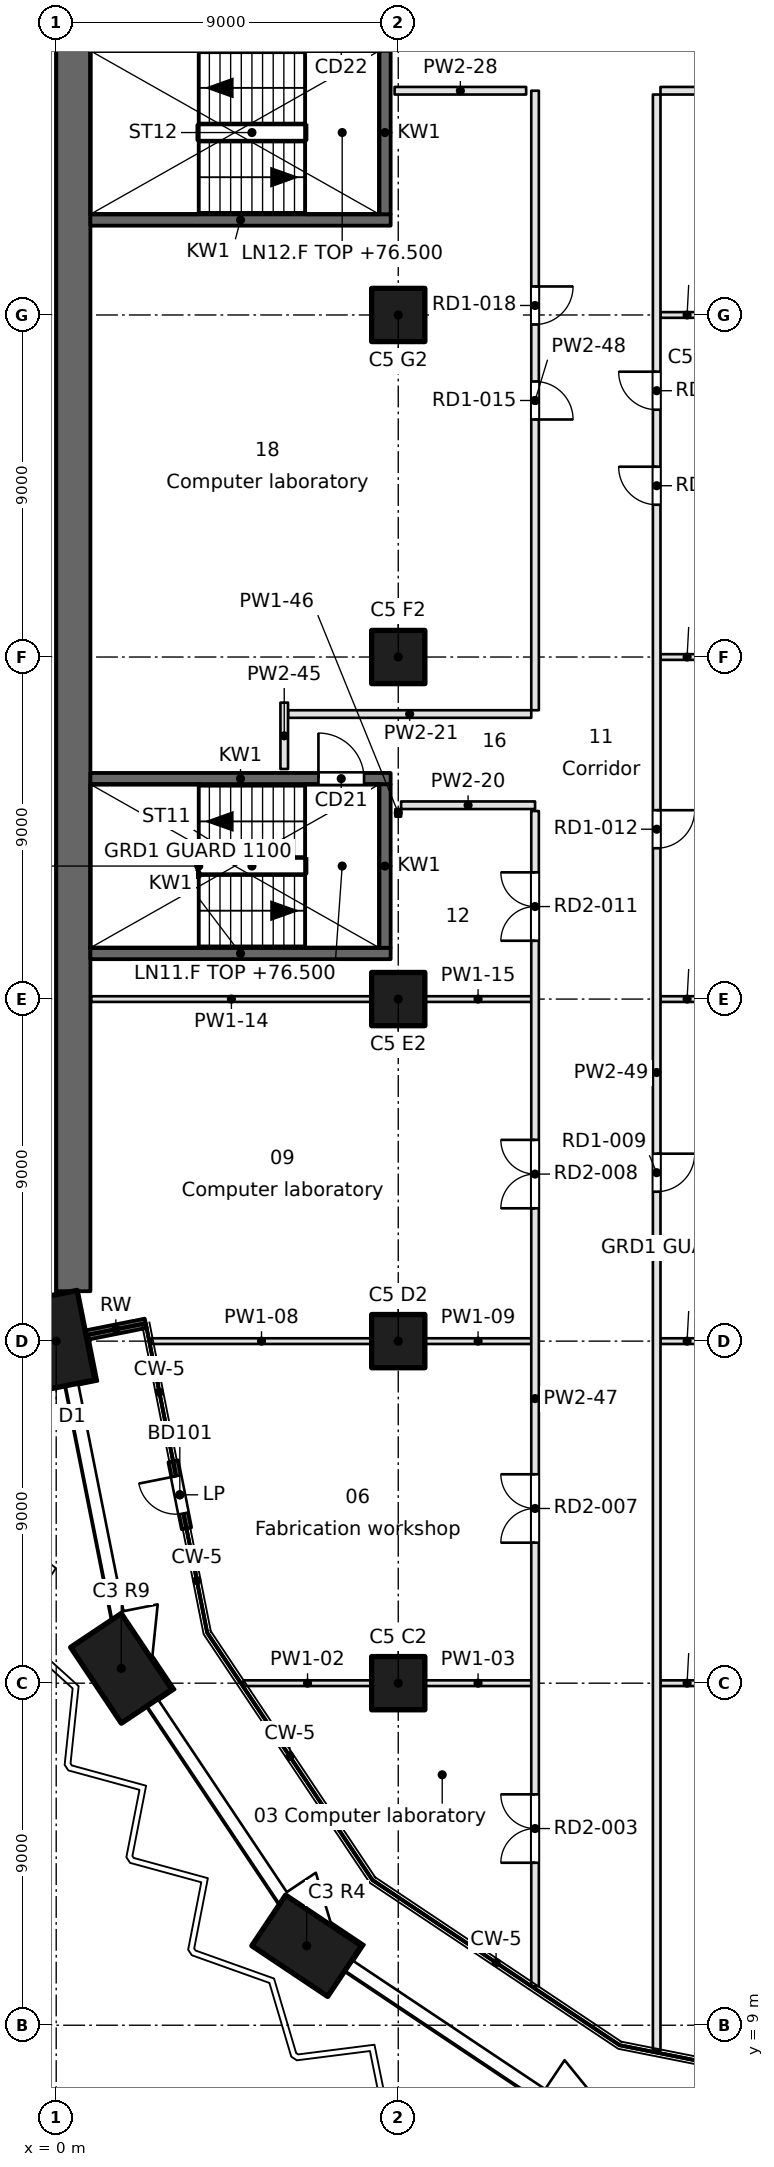
"""IFC4 building model, lengths in metres.
Left out: names, types, materials, properties, quantities, classifications, styles, units other than length and angle.
Written with IfcOpenShell. Run it as: python <this file> out.ifc"""

import sys

from ifc_helpers import new_model, si_unit, direction, frame, frame_2d, origin, origin_2d, place, context, subcontext, project, spatial, rectangle, extrude, element, fill, save


model = new_model("IFC4")
c1 = context("Model", 3, precision=1e-05, world=origin(), true_north=direction((0.0, 1.0)))
c2 = subcontext(c1, "Body", "Model", "MODEL_VIEW")
j1 = project(units=[si_unit("LENGTHUNIT", "METRE"), si_unit("PLANEANGLEUNIT", "RADIAN")], contexts=[c1])
p1 = place(None, origin())
s1 = spatial("IfcSite", under=j1, at=p1, CompositionType="ELEMENT")
p2 = place(p1, origin())
s2 = spatial("IfcBuilding", under=s1, at=p2, CompositionType="ELEMENT")
p3 = place(p2, frame((0.0, 0.0, 76.5)))
s3 = spatial("IfcBuildingStorey", under=s2, at=p3, CompositionType="ELEMENT", Elevation=76.5)
for number, where, z_axis, x_axis in (
    (1, (6.59, 11.09, 0.0), (0.0, 0.0, 1.0), (-0.831, 0.556, 0.0)),
    (2, (1.713, 18.39, 0.0), (0.0, 0.0, 1.0), (-0.556, 0.831, 0.0)),
    (3, (0.0, 27.0, 0.0), (0.0, 0.0, 1.0), (-0.195, 0.981, 0.0)),
):
    element("IfcColumn", number, at=place(p3, frame(where, z_axis=z_axis, x_axis=x_axis)), inside=s3, PredefinedType="COLUMN", context=c2, shape_type="SweptSolid", body=[
        extrude(rectangle(XDim=2.4, YDim=1.6, at=origin_2d()), origin(), (0.0, 0.0, 1.0), 3.7),
    ])
for number, where, z_axis, x_axis in (
    (4, (9.0, 18.0, 0.0), (0.0, 0.0, 1.0), (1.0, 0.0, 0.0)),
    (5, (9.0, 27.0, 0.0), (0.0, 0.0, 1.0), (1.0, 0.0, 0.0)),
    (6, (9.0, 36.0, 0.0), (0.0, 0.0, 1.0), (1.0, 0.0, 0.0)),
    (7, (9.0, 45.0, 0.0), (0.0, 0.0, 1.0), (1.0, 0.0, 0.0)),
    (8, (9.0, 54.0, 0.0), (0.0, 0.0, 1.0), (1.0, 0.0, 0.0)),
):
    element("IfcColumn", number, at=place(p3, frame(where, z_axis=z_axis, x_axis=x_axis)), inside=s3, PredefinedType="COLUMN", context=c2, shape_type="SweptSolid", body=[
        extrude(rectangle(XDim=1.4, YDim=1.4, at=origin_2d()), origin(), (0.0, 0.0, 1.0), 3.7),
    ])
p4 = place(p3, frame((0.45, 94.5, 0.0), z_axis=(0.0, 0.0, 1.0), x_axis=(0.0, -1.0, 0.0)))
e9 = element("IfcWall", 9, at=p4, inside=s3, PredefinedType="SHEAR", context=c2, shape_type="SweptSolid", body=[
    extrude(rectangle(XDim=66.187, YDim=0.9, at=frame_2d((33.094, 0.0))), origin(), (0.0, 0.0, 1.0), 3.7),
])
p5 = place(p3, frame((0.784, 27.157, 0.0), z_axis=(0.0, 0.0, 1.0), x_axis=(0.980826234823, 0.19488431718, 0.0)))
e10 = element("IfcWall", 10, at=p5, inside=s3, PredefinedType="SOLIDWALL", context=c2, shape_type="SweptSolid", body=[
    extrude(rectangle(XDim=1.601, YDim=0.25, at=frame_2d((0.801, 0.0))), origin(), (0.0, 0.0, 1.0), 3.25),
])
p6 = place(p3, frame((3.077, 23.839, 0.0), z_axis=(0.0, 0.0, 1.0), x_axis=(0.195046569833, -0.980793982239, 0.0)))
e11 = element("IfcWall", 11, at=p6, inside=s3, PredefinedType="SOLIDWALL", context=c2, shape_type="SweptSolid", body=[
    extrude(rectangle(XDim=1.8, YDim=0.25, at=frame_2d((0.9, 0.0))), origin(), (0.0, 0.0, 1.0), 3.25),
])
p7 = place(p6, frame((0.4, 0.0, 0.0)))
e12 = element("IfcOpeningElement", 12, at=p7, cuts=e11, PredefinedType="OPENING", context=c2, shape_type="SweptSolid", body=[
    extrude(rectangle(XDim=1.0, YDim=2.1, at=frame_2d((0.5, 1.05))), frame((0.0, 0.125, 0.0), z_axis=(0.0, -1.0, 0.0), x_axis=(1.0, 0.0, 0.0)), (0.0, 0.0, 1.0), 0.25),
])
p8 = place(p3, frame((0.9, 37.2, -0.4), z_axis=(0.0, 0.0, 1.0), x_axis=(1.0, 0.0, 0.0)))
e13 = element("IfcWall", 13, at=p8, inside=s3, PredefinedType="SOLIDWALL", context=c2, shape_type="SweptSolid", body=[
    extrude(rectangle(XDim=7.9, YDim=0.3, at=frame_2d((3.95, 0.0))), origin(), (0.0, 0.0, 1.0), 3.65),
])
p9 = place(p3, frame((0.9, 41.8, -0.4), z_axis=(0.0, 0.0, 1.0), x_axis=(1.0, 0.0, 0.0)))
e14 = element("IfcWall", 14, at=p9, inside=s3, PredefinedType="SOLIDWALL", context=c2, shape_type="SweptSolid", body=[
    extrude(rectangle(XDim=7.9, YDim=0.3, at=frame_2d((3.95, 0.0))), origin(), (0.0, 0.0, 1.0), 3.65),
])
p10 = place(p9, frame((6.0, 0.0, 0.4)))
e15 = element("IfcOpeningElement", 15, at=p10, cuts=e14, PredefinedType="OPENING", context=c2, shape_type="SweptSolid", body=[
    extrude(rectangle(XDim=1.2, YDim=2.1, at=frame_2d((0.6, 1.05))), frame((0.0, 0.15, 0.0), z_axis=(0.0, -1.0, 0.0), x_axis=(1.0, 0.0, 0.0)), (0.0, 0.0, 1.0), 0.3),
])
p11 = place(p3, frame((0.9, 56.5, -0.4), z_axis=(0.0, 0.0, 1.0), x_axis=(1.0, 0.0, 0.0)))
e16 = element("IfcWall", 16, at=p11, inside=s3, PredefinedType="SOLIDWALL", context=c2, shape_type="SweptSolid", body=[
    extrude(rectangle(XDim=7.9, YDim=0.3, at=frame_2d((3.95, 0.0))), origin(), (0.0, 0.0, 1.0), 3.65),
])
p12 = place(p3, frame((8.65, 37.35, -0.4), z_axis=(0.0, 0.0, 1.0), x_axis=(0.0, 1.0, 0.0)))
e17 = element("IfcWall", 17, at=p12, inside=s3, PredefinedType="SOLIDWALL", context=c2, shape_type="SweptSolid", body=[
    extrude(rectangle(XDim=4.3, YDim=0.3, at=frame_2d((2.15, 0.0))), origin(), (0.0, 0.0, 1.0), 3.65),
])
p13 = place(p3, frame((8.65, 56.65, -0.4), z_axis=(0.0, 0.0, 1.0), x_axis=(0.0, 1.0, 0.0)))
e18 = element("IfcWall", 18, at=p13, inside=s3, PredefinedType="SOLIDWALL", context=c2, shape_type="SweptSolid", body=[
    extrude(rectangle(XDim=4.3, YDim=0.3, at=frame_2d((2.15, 0.0))), origin(), (0.0, 0.0, 1.0), 3.65),
])
p14 = place(p3, frame((4.926, 18.0, 0.0), z_axis=(0.0, 0.0, 1.0), x_axis=(1.0, 0.0, 0.0)))
e19 = element("IfcWall", 19, at=p14, inside=s3, PredefinedType="PARTITIONING", context=c2, shape_type="SweptSolid", body=[
    extrude(rectangle(XDim=3.375, YDim=0.15, at=frame_2d((1.687, 0.0))), origin(), (0.0, 0.0, 1.0), 3.25),
])
p15 = place(p3, frame((9.7, 18.0, 0.0), z_axis=(0.0, 0.0, 1.0), x_axis=(1.0, 0.0, 0.0)))
e20 = element("IfcWall", 20, at=p15, inside=s3, PredefinedType="PARTITIONING", context=c2, shape_type="SweptSolid", body=[
    extrude(rectangle(XDim=2.8, YDim=0.15, at=frame_2d((1.4, 0.0))), origin(), (0.0, 0.0, 1.0), 3.25),
])
p16 = place(p3, frame((15.9, 18.0, 0.0), z_axis=(0.0, 0.0, 1.0), x_axis=(1.0, 0.0, 0.0)))
e21 = element("IfcWall", 21, at=p16, inside=s3, PredefinedType="PARTITIONING", context=c2, shape_type="SweptSolid", body=[
    extrude(rectangle(XDim=1.4, YDim=0.15, at=frame_2d((0.7, 0.0))), origin(), (0.0, 0.0, 1.0), 3.25),
])
p17 = place(p3, frame((2.503, 27.0, 0.0), z_axis=(0.0, 0.0, 1.0), x_axis=(1.0, 0.0, 0.0)))
e22 = element("IfcWall", 22, at=p17, inside=s3, PredefinedType="PARTITIONING", context=c2, shape_type="SweptSolid", body=[
    extrude(rectangle(XDim=5.797, YDim=0.15, at=frame_2d((2.898, 0.0))), origin(), (0.0, 0.0, 1.0), 3.25),
])
p18 = place(p3, frame((9.7, 27.0, 0.0), z_axis=(0.0, 0.0, 1.0), x_axis=(1.0, 0.0, 0.0)))
e23 = element("IfcWall", 23, at=p18, inside=s3, PredefinedType="PARTITIONING", context=c2, shape_type="SweptSolid", body=[
    extrude(rectangle(XDim=2.8, YDim=0.15, at=frame_2d((1.4, 0.0))), origin(), (0.0, 0.0, 1.0), 3.25),
])
p19 = place(p3, frame((15.9, 27.0, 0.0), z_axis=(0.0, 0.0, 1.0), x_axis=(1.0, 0.0, 0.0)))
e24 = element("IfcWall", 24, at=p19, inside=s3, PredefinedType="PARTITIONING", context=c2, shape_type="SweptSolid", body=[
    extrude(rectangle(XDim=1.4, YDim=0.15, at=frame_2d((0.7, 0.0))), origin(), (0.0, 0.0, 1.0), 3.25),
])
p20 = place(p3, frame((0.92, 36.0, 0.0), z_axis=(0.0, 0.0, 1.0), x_axis=(1.0, 0.0, 0.0)))
e25 = element("IfcWall", 25, at=p20, inside=s3, PredefinedType="PARTITIONING", context=c2, shape_type="SweptSolid", body=[
    extrude(rectangle(XDim=7.38, YDim=0.15, at=frame_2d((3.69, 0.0))), origin(), (0.0, 0.0, 1.0), 3.25),
])
p21 = place(p3, frame((9.7, 36.0, 0.0), z_axis=(0.0, 0.0, 1.0), x_axis=(1.0, 0.0, 0.0)))
e26 = element("IfcWall", 26, at=p21, inside=s3, PredefinedType="PARTITIONING", context=c2, shape_type="SweptSolid", body=[
    extrude(rectangle(XDim=2.8, YDim=0.15, at=frame_2d((1.4, 0.0))), origin(), (0.0, 0.0, 1.0), 3.25),
])
p22 = place(p3, frame((15.9, 36.0, 0.0), z_axis=(0.0, 0.0, 1.0), x_axis=(1.0, 0.0, 0.0)))
e27 = element("IfcWall", 27, at=p22, inside=s3, PredefinedType="PARTITIONING", context=c2, shape_type="SweptSolid", body=[
    extrude(rectangle(XDim=1.4, YDim=0.15, at=frame_2d((0.7, 0.0))), origin(), (0.0, 0.0, 1.0), 3.25),
])
p23 = place(p3, frame((12.6, 41.1, 0.0), z_axis=(0.0, 0.0, 1.0), x_axis=(-1.0, 0.0, 0.0)))
e28 = element("IfcWall", 28, at=p23, inside=s3, PredefinedType="PARTITIONING", context=c2, shape_type="SweptSolid", body=[
    extrude(rectangle(XDim=3.525, YDim=0.2, at=frame_2d((1.763, 0.0))), origin(), (0.0, 0.0, 1.0), 3.25),
])
p24 = place(p3, frame((6.1, 43.5, 0.0), z_axis=(0.0, 0.0, 1.0), x_axis=(1.0, 0.0, 0.0)))
e29 = element("IfcWall", 29, at=p24, inside=s3, PredefinedType="PARTITIONING", context=c2, shape_type="SweptSolid", body=[
    extrude(rectangle(XDim=6.4, YDim=0.2, at=frame_2d((3.2, 0.0))), origin(), (0.0, 0.0, 1.0), 3.25),
])
for number, where, z_axis, x_axis in (
    (30, (15.9, 45.0, 0.0), (0.0, 0.0, 1.0), (1.0, 0.0, 0.0)),
    (31, (15.9, 54.0, 0.0), (0.0, 0.0, 1.0), (1.0, 0.0, 0.0)),
):
    element("IfcWall", number, at=place(p3, frame(where, z_axis=z_axis, x_axis=x_axis)), inside=s3, PredefinedType="PARTITIONING", context=c2, shape_type="SweptSolid", body=[
        extrude(rectangle(XDim=1.4, YDim=0.15, at=frame_2d((0.7, 0.0))), origin(), (0.0, 0.0, 1.0), 3.25),
    ])
p25 = place(p3, frame((12.365, 59.9, 0.0), z_axis=(0.0, 0.0, 1.0), x_axis=(-1.0, 0.0, 0.0)))
e32 = element("IfcWall", 32, at=p25, inside=s3, PredefinedType="PARTITIONING", context=c2, shape_type="SweptSolid", body=[
    extrude(rectangle(XDim=3.461, YDim=0.2, at=frame_2d((1.73, 0.0))), origin(), (0.0, 0.0, 1.0), 3.25),
])
p26 = place(p3, frame((24.1, 59.9, 0.0), z_axis=(0.0, 0.0, 1.0), x_axis=(-1.0, 0.0, 0.0)))
e33 = element("IfcWall", 33, at=p26, inside=s3, PredefinedType="PARTITIONING", context=c2, shape_type="SweptSolid", body=[
    extrude(rectangle(XDim=8.2, YDim=0.2, at=frame_2d((4.1, 0.0))), origin(), (0.0, 0.0, 1.0), 3.25),
])
p27 = place(p26, frame((3.6, 0.0, 0.0)))
e34 = element("IfcOpeningElement", 34, at=p27, cuts=e33, PredefinedType="OPENING", context=c2, shape_type="SweptSolid", body=[
    extrude(rectangle(XDim=1.0, YDim=2.1, at=frame_2d((0.5, 1.05))), frame((0.0, 0.1, 0.0), z_axis=(0.0, -1.0, 0.0), x_axis=(1.0, 0.0, 0.0)), (0.0, 0.0, 1.0), 0.2),
])
p28 = place(p3, frame((6.0, 42.054, 0.0), z_axis=(0.0, 0.0, 1.0), x_axis=(0.0, 1.0, 0.0)))
e35 = element("IfcWall", 35, at=p28, inside=s3, PredefinedType="PARTITIONING", context=c2, shape_type="SweptSolid", body=[
    extrude(rectangle(XDim=1.746, YDim=0.2, at=frame_2d((0.873, 0.0))), origin(), (0.0, 0.0, 1.0), 3.25),
])
p29 = place(p3, frame((9.0, 41.0, 0.0), z_axis=(0.0, 0.0, 1.0), x_axis=(0.0, -1.0, 0.0)))
e36 = element("IfcWall", 36, at=p29, inside=s3, PredefinedType="PARTITIONING", context=c2, shape_type="SweptSolid", body=[
    extrude(rectangle(XDim=0.2, YDim=0.15, at=frame_2d((0.1, 0.0))), origin(), (0.0, 0.0, 1.0), 3.25),
])
p30 = place(p3, frame((12.6, 10.027, 0.0), z_axis=(0.0, 0.0, 1.0), x_axis=(0.0, 1.0, 0.0)))
e37 = element("IfcWall", 37, at=p30, inside=s3, PredefinedType="PARTITIONING", context=c2, shape_type="SweptSolid", body=[
    extrude(rectangle(XDim=30.921, YDim=0.2, at=frame_2d((15.46, 0.0))), origin(), (0.0, 0.0, 1.0), 3.25),
])
p31 = place(p30, frame((3.248, 0.0, 0.0)))
e38 = element("IfcOpeningElement", 38, at=p31, cuts=e37, PredefinedType="OPENING", context=c2, shape_type="SweptSolid", body=[
    extrude(rectangle(XDim=1.8, YDim=2.1, at=frame_2d((0.9, 1.05))), frame((0.0, 0.1, 0.0), z_axis=(0.0, -1.0, 0.0), x_axis=(1.0, 0.0, 0.0)), (0.0, 0.0, 1.0), 0.2),
])
p32 = place(p30, frame((11.67, 0.0, 0.0)))
e39 = element("IfcOpeningElement", 39, at=p32, cuts=e37, PredefinedType="OPENING", context=c2, shape_type="SweptSolid", body=[
    extrude(rectangle(XDim=1.8, YDim=2.1, at=frame_2d((0.9, 1.05))), frame((0.0, 0.1, 0.0), z_axis=(0.0, -1.0, 0.0), x_axis=(1.0, 0.0, 0.0)), (0.0, 0.0, 1.0), 0.2),
])
p33 = place(p30, frame((20.468, 0.0, 0.0)))
e40 = element("IfcOpeningElement", 40, at=p33, cuts=e37, PredefinedType="OPENING", context=c2, shape_type="SweptSolid", body=[
    extrude(rectangle(XDim=1.8, YDim=2.1, at=frame_2d((0.9, 1.05))), frame((0.0, 0.1, 0.0), z_axis=(0.0, -1.0, 0.0), x_axis=(1.0, 0.0, 0.0)), (0.0, 0.0, 1.0), 0.2),
])
p34 = place(p30, frame((27.507, 0.0, 0.0)))
e41 = element("IfcOpeningElement", 41, at=p34, cuts=e37, PredefinedType="OPENING", context=c2, shape_type="SweptSolid", body=[
    extrude(rectangle(XDim=1.8, YDim=2.1, at=frame_2d((0.9, 1.05))), frame((0.0, 0.1, 0.0), z_axis=(0.0, -1.0, 0.0), x_axis=(1.0, 0.0, 0.0)), (0.0, 0.0, 1.0), 0.2),
])
p35 = place(p3, frame((12.6, 43.6, 0.0), z_axis=(0.0, 0.0, 1.0), x_axis=(0.0, 1.0, 0.0)))
e42 = element("IfcWall", 42, at=p35, inside=s3, PredefinedType="PARTITIONING", context=c2, shape_type="SweptSolid", body=[
    extrude(rectangle(XDim=16.3, YDim=0.2, at=frame_2d((8.15, 0.0))), origin(), (0.0, 0.0, 1.0), 3.25),
])
p36 = place(p35, frame((7.65, 0.0, 0.0)))
e43 = element("IfcOpeningElement", 43, at=p36, cuts=e42, PredefinedType="OPENING", context=c2, shape_type="SweptSolid", body=[
    extrude(rectangle(XDim=1.0, YDim=2.1, at=frame_2d((0.5, 1.05))), frame((0.0, 0.1, 0.0), z_axis=(0.0, -1.0, 0.0), x_axis=(1.0, 0.0, 0.0)), (0.0, 0.0, 1.0), 0.2),
])
p37 = place(p35, frame((10.15, 0.0, 0.0)))
e44 = element("IfcOpeningElement", 44, at=p37, cuts=e42, PredefinedType="OPENING", context=c2, shape_type="SweptSolid", body=[
    extrude(rectangle(XDim=1.0, YDim=2.1, at=frame_2d((0.5, 1.05))), frame((0.0, 0.1, 0.0), z_axis=(0.0, -1.0, 0.0), x_axis=(1.0, 0.0, 0.0)), (0.0, 0.0, 1.0), 0.2),
])
p38 = place(p3, frame((15.8, 59.8, 0.0), z_axis=(0.0, 0.0, 1.0), x_axis=(0.0, -1.0, 0.0)))
e45 = element("IfcWall", 45, at=p38, inside=s3, PredefinedType="PARTITIONING", context=c2, shape_type="SweptSolid", body=[
    extrude(rectangle(XDim=51.464, YDim=0.2, at=frame_2d((25.732, 0.0))), origin(), (0.0, 0.0, 1.0), 3.25),
])
p39 = place(p38, frame((27.868, 0.0, 0.0)))
e46 = element("IfcOpeningElement", 46, at=p39, cuts=e45, PredefinedType="OPENING", context=c2, shape_type="SweptSolid", body=[
    extrude(rectangle(XDim=1.0, YDim=2.1, at=frame_2d((0.5, 1.05))), frame((0.0, 0.1, 0.0), z_axis=(0.0, -1.0, 0.0), x_axis=(1.0, 0.0, 0.0)), (0.0, 0.0, 1.0), 0.2),
])
p40 = place(p38, frame((18.831, 0.0, 0.0)))
e47 = element("IfcOpeningElement", 47, at=p40, cuts=e45, PredefinedType="OPENING", context=c2, shape_type="SweptSolid", body=[
    extrude(rectangle(XDim=1.0, YDim=2.1, at=frame_2d((0.5, 1.05))), frame((0.0, 0.1, 0.0), z_axis=(0.0, -1.0, 0.0), x_axis=(1.0, 0.0, 0.0)), (0.0, 0.0, 1.0), 0.2),
])
p41 = place(p38, frame((9.793, 0.0, 0.0)))
e48 = element("IfcOpeningElement", 48, at=p41, cuts=e45, PredefinedType="OPENING", context=c2, shape_type="SweptSolid", body=[
    extrude(rectangle(XDim=1.0, YDim=2.1, at=frame_2d((0.5, 1.05))), frame((0.0, 0.1, 0.0), z_axis=(0.0, -1.0, 0.0), x_axis=(1.0, 0.0, 0.0)), (0.0, 0.0, 1.0), 0.2),
])
p42 = place(p38, frame((7.293, 0.0, 0.0)))
e49 = element("IfcOpeningElement", 49, at=p42, cuts=e45, PredefinedType="OPENING", context=c2, shape_type="SweptSolid", body=[
    extrude(rectangle(XDim=1.0, YDim=2.1, at=frame_2d((0.5, 1.05))), frame((0.0, 0.1, 0.0), z_axis=(0.0, -1.0, 0.0), x_axis=(1.0, 0.0, 0.0)), (0.0, 0.0, 1.0), 0.2),
])
p43 = place(p7, frame((1.0, 0.0, 0.0), z_axis=(0.0, 0.0, 1.0), x_axis=(-1.0, 0.0, 0.0)))
e50 = element("IfcDoor", 50, at=p43, inside=s3, OperationType="SINGLE_SWING_RIGHT", PredefinedType="DOOR", context=c2, shape_type="SweptSolid", body=[
    extrude(rectangle(XDim=1.0, YDim=2.1, at=frame_2d((0.5, 1.05))), frame((0.0, 0.025, 0.0), z_axis=(0.0, -1.0, 0.0), x_axis=(1.0, 0.0, 0.0)), (0.0, 0.0, 1.0), 0.05),
])
fill(e12, e50)
p44 = place(p10, origin())
e51 = element("IfcDoor", 51, at=p44, inside=s3, OperationType="SINGLE_SWING_LEFT", PredefinedType="DOOR", context=c2, shape_type="SweptSolid", body=[
    extrude(rectangle(XDim=1.2, YDim=2.1, at=frame_2d((0.6, 1.05))), frame((0.0, 0.025, 0.0), z_axis=(0.0, -1.0, 0.0), x_axis=(1.0, 0.0, 0.0)), (0.0, 0.0, 1.0), 0.05),
])
fill(e15, e51)
p45 = place(p31, origin())
e52 = element("IfcDoor", 52, at=p45, inside=s3, OperationType="DOUBLE_DOOR_SINGLE_SWING", PredefinedType="DOOR", context=c2, shape_type="SweptSolid", body=[
    extrude(rectangle(XDim=1.8, YDim=2.1, at=frame_2d((0.9, 1.05))), frame((0.0, 0.025, 0.0), z_axis=(0.0, -1.0, 0.0), x_axis=(1.0, 0.0, 0.0)), (0.0, 0.0, 1.0), 0.05),
])
fill(e38, e52)
p46 = place(p32, origin())
e53 = element("IfcDoor", 53, at=p46, inside=s3, OperationType="DOUBLE_DOOR_SINGLE_SWING", PredefinedType="DOOR", context=c2, shape_type="SweptSolid", body=[
    extrude(rectangle(XDim=1.8, YDim=2.1, at=frame_2d((0.9, 1.05))), frame((0.0, 0.025, 0.0), z_axis=(0.0, -1.0, 0.0), x_axis=(1.0, 0.0, 0.0)), (0.0, 0.0, 1.0), 0.05),
])
fill(e39, e53)
p47 = place(p33, origin())
e54 = element("IfcDoor", 54, at=p47, inside=s3, OperationType="DOUBLE_DOOR_SINGLE_SWING", PredefinedType="DOOR", context=c2, shape_type="SweptSolid", body=[
    extrude(rectangle(XDim=1.8, YDim=2.1, at=frame_2d((0.9, 1.05))), frame((0.0, 0.025, 0.0), z_axis=(0.0, -1.0, 0.0), x_axis=(1.0, 0.0, 0.0)), (0.0, 0.0, 1.0), 0.05),
])
fill(e40, e54)
p48 = place(p39, origin())
e55 = element("IfcDoor", 55, at=p48, inside=s3, OperationType="SINGLE_SWING_LEFT", PredefinedType="DOOR", context=c2, shape_type="SweptSolid", body=[
    extrude(rectangle(XDim=1.0, YDim=2.1, at=frame_2d((0.5, 1.05))), frame((0.0, 0.025, 0.0), z_axis=(0.0, -1.0, 0.0), x_axis=(1.0, 0.0, 0.0)), (0.0, 0.0, 1.0), 0.05),
])
fill(e46, e55)
p49 = place(p34, origin())
e56 = element("IfcDoor", 56, at=p49, inside=s3, OperationType="DOUBLE_DOOR_SINGLE_SWING", PredefinedType="DOOR", context=c2, shape_type="SweptSolid", body=[
    extrude(rectangle(XDim=1.8, YDim=2.1, at=frame_2d((0.9, 1.05))), frame((0.0, 0.025, 0.0), z_axis=(0.0, -1.0, 0.0), x_axis=(1.0, 0.0, 0.0)), (0.0, 0.0, 1.0), 0.05),
])
fill(e41, e56)
p50 = place(p40, origin())
e57 = element("IfcDoor", 57, at=p50, inside=s3, OperationType="SINGLE_SWING_LEFT", PredefinedType="DOOR", context=c2, shape_type="SweptSolid", body=[
    extrude(rectangle(XDim=1.0, YDim=2.1, at=frame_2d((0.5, 1.05))), frame((0.0, 0.025, 0.0), z_axis=(0.0, -1.0, 0.0), x_axis=(1.0, 0.0, 0.0)), (0.0, 0.0, 1.0), 0.05),
])
fill(e47, e57)
p51 = place(p41, frame((1.0, 0.0, 0.0), z_axis=(0.0, 0.0, 1.0), x_axis=(-1.0, 0.0, 0.0)))
e58 = element("IfcDoor", 58, at=p51, inside=s3, OperationType="SINGLE_SWING_RIGHT", PredefinedType="DOOR", context=c2, shape_type="SweptSolid", body=[
    extrude(rectangle(XDim=1.0, YDim=2.1, at=frame_2d((0.5, 1.05))), frame((0.0, 0.025, 0.0), z_axis=(0.0, -1.0, 0.0), x_axis=(1.0, 0.0, 0.0)), (0.0, 0.0, 1.0), 0.05),
])
fill(e48, e58)
p52 = place(p36, frame((1.0, 0.0, 0.0), z_axis=(0.0, 0.0, 1.0), x_axis=(-1.0, 0.0, 0.0)))
e59 = element("IfcDoor", 59, at=p52, inside=s3, OperationType="SINGLE_SWING_RIGHT", PredefinedType="DOOR", context=c2, shape_type="SweptSolid", body=[
    extrude(rectangle(XDim=1.0, YDim=2.1, at=frame_2d((0.5, 1.05))), frame((0.0, 0.025, 0.0), z_axis=(0.0, -1.0, 0.0), x_axis=(1.0, 0.0, 0.0)), (0.0, 0.0, 1.0), 0.05),
])
fill(e43, e59)
p53 = place(p42, frame((1.0, 0.0, 0.0), z_axis=(0.0, 0.0, 1.0), x_axis=(-1.0, 0.0, 0.0)))
e60 = element("IfcDoor", 60, at=p53, inside=s3, OperationType="SINGLE_SWING_RIGHT", PredefinedType="DOOR", context=c2, shape_type="SweptSolid", body=[
    extrude(rectangle(XDim=1.0, YDim=2.1, at=frame_2d((0.5, 1.05))), frame((0.0, 0.025, 0.0), z_axis=(0.0, -1.0, 0.0), x_axis=(1.0, 0.0, 0.0)), (0.0, 0.0, 1.0), 0.05),
])
fill(e49, e60)
p54 = place(p37, frame((1.0, 0.0, 0.0), z_axis=(0.0, 0.0, 1.0), x_axis=(-1.0, 0.0, 0.0)))
e61 = element("IfcDoor", 61, at=p54, inside=s3, OperationType="SINGLE_SWING_LEFT", PredefinedType="DOOR", context=c2, shape_type="SweptSolid", body=[
    extrude(rectangle(XDim=1.0, YDim=2.1, at=frame_2d((0.5, 1.05))), frame((0.0, 0.025, 0.0), z_axis=(0.0, -1.0, 0.0), x_axis=(1.0, 0.0, 0.0)), (0.0, 0.0, 1.0), 0.05),
])
fill(e44, e61)
save(model, sys.argv[1])
